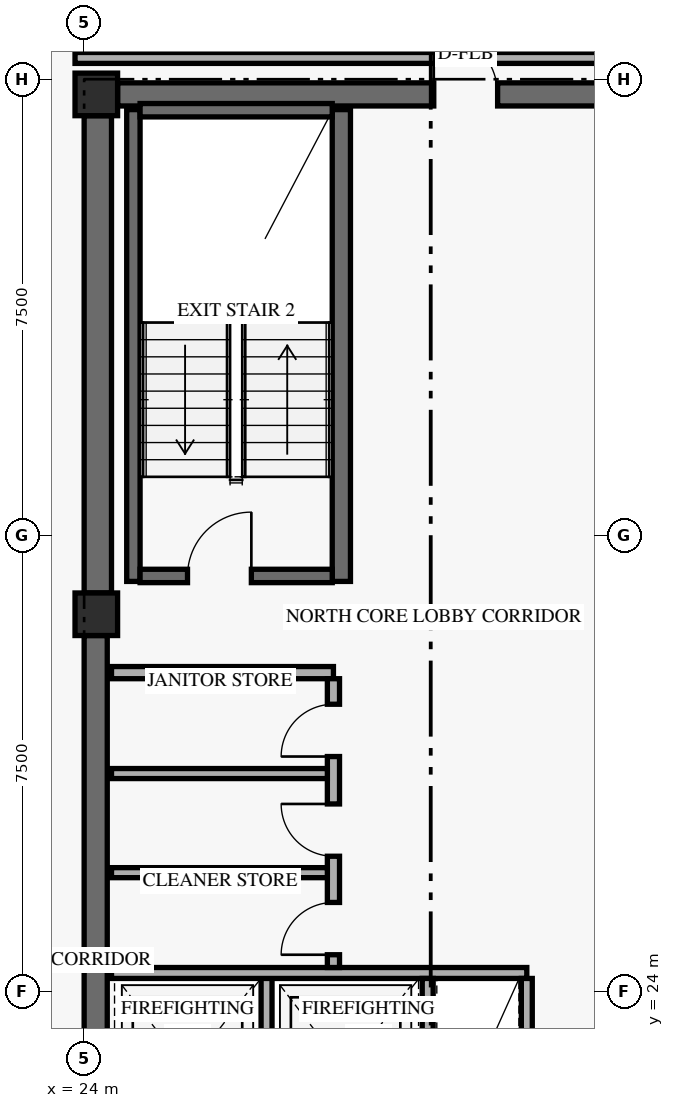
"""IFC4 building model, lengths in metres.
Left out: names, types, materials, properties, quantities, classifications, styles, units other than length and angle.
Written with IfcOpenShell. Run it as: python <this file> out.ifc"""

import sys

from ifc_helpers import new_model, si_unit, direction, frame, frame_2d, origin, origin_2d, place, context, subcontext, project, spatial, rectangle, extrude, element, fill, save


model = new_model("IFC4")
c1 = context("Model", 3, precision=1e-05, world=origin(), true_north=direction((0.0, 1.0)))
c2 = subcontext(c1, "Body", "Model", "MODEL_VIEW")
j1 = project(units=[si_unit("LENGTHUNIT", "METRE"), si_unit("PLANEANGLEUNIT", "RADIAN")], contexts=[c1])
p1 = place(None, origin())
s1 = spatial("IfcSite", under=j1, at=p1, CompositionType="ELEMENT")
p2 = place(p1, origin())
s2 = spatial("IfcBuilding", under=s1, at=p2, CompositionType="ELEMENT")
p3 = place(p2, frame((0.0, 0.0, 151.8)))
s3 = spatial("IfcBuildingStorey", under=s2, at=p3, CompositionType="ELEMENT", Elevation=151.8)
p4 = place(p3, frame((24.19, 17.9, 0.0), z_axis=(0.0, 0.0, 1.0), x_axis=(0.0, 1.0, 0.0)))
e1 = element("IfcWall", 1, at=p4, inside=s3, PredefinedType="SHEAR", context=c2, shape_type="SweptSolid", body=[
    extrude(rectangle(XDim=11.95, YDim=0.38, at=frame_2d((5.975, 0.0))), origin(), (0.0, 0.0, 1.0), 2.748),
])
p5 = place(p3, frame((24.225, 30.55, 0.0), z_axis=(0.0, 0.0, 1.0), x_axis=(0.0, 1.0, 0.0)))
e2 = element("IfcWall", 2, at=p5, inside=s3, PredefinedType="SHEAR", context=c2, shape_type="SweptSolid", body=[
    extrude(rectangle(XDim=7.85, YDim=0.45, at=frame_2d((3.925, 0.0))), origin(), (0.0, 0.0, 1.0), 2.748),
])
p6 = place(p3, frame((24.55, 38.75, 0.0), z_axis=(0.0, 0.0, 1.0), x_axis=(1.0, 0.0, 0.0)))
e3 = element("IfcWall", 3, at=p6, inside=s3, PredefinedType="SHEAR", context=c2, shape_type="SweptSolid", body=[
    extrude(rectangle(XDim=10.3, YDim=0.38, at=frame_2d((5.15, 0.0))), origin(), (0.0, 0.0, 1.0), 3.36),
])
p7 = place(p6, frame((5.2, 0.0, 0.0)))
e4 = element("IfcOpeningElement", 4, at=p7, cuts=e3, PredefinedType="OPENING", context=c2, shape_type="SweptSolid", body=[
    extrude(rectangle(XDim=1.05, YDim=2.15, at=frame_2d((0.525, 1.075))), frame((0.0, 0.2, 0.0), z_axis=(0.0, -1.0, 0.0), x_axis=(1.0, 0.0, 0.0)), (0.0, 0.0, 1.0), 0.4),
])
p8 = place(p3, frame((24.81, 30.74, 0.0), z_axis=(0.0, 0.0, 1.0), x_axis=(0.0, 1.0, 0.0)))
e5 = element("IfcWall", 5, at=p8, inside=s3, PredefinedType="SHEAR", context=c2, shape_type="SweptSolid", body=[
    extrude(rectangle(XDim=7.76, YDim=0.22, at=frame_2d((3.88, 0.0))), origin(), (0.0, 0.0, 1.0), 3.36),
])
p9 = place(p3, frame((28.23, 30.74, 0.0), z_axis=(0.0, 0.0, 1.0), x_axis=(0.0, 1.0, 0.0)))
e6 = element("IfcWall", 6, at=p9, inside=s3, PredefinedType="SHEAR", context=c2, shape_type="SweptSolid", body=[
    extrude(rectangle(XDim=7.76, YDim=0.3, at=frame_2d((3.88, 0.0))), origin(), (0.0, 0.0, 1.0), 3.36),
])
p10 = place(p3, frame((24.92, 30.83, 0.0), z_axis=(0.0, 0.0, 1.0), x_axis=(1.0, 0.0, 0.0)))
e7 = element("IfcWall", 7, at=p10, inside=s3, PredefinedType="SHEAR", context=c2, shape_type="SweptSolid", body=[
    extrude(rectangle(XDim=3.16, YDim=0.22, at=frame_2d((1.58, 0.0))), origin(), (0.0, 0.0, 1.0), 3.36),
])
p11 = place(p10, frame((0.78, 0.0, 0.0)))
e8 = element("IfcOpeningElement", 8, at=p11, cuts=e7, PredefinedType="OPENING", context=c2, shape_type="SweptSolid", body=[
    extrude(rectangle(XDim=1.05, YDim=2.15, at=frame_2d((0.525, 1.075))), frame((0.0, 0.12, 0.0), z_axis=(0.0, -1.0, 0.0), x_axis=(1.0, 0.0, 0.0)), (0.0, 0.0, 1.0), 0.24),
])
p12 = place(p3, frame((24.92, 38.49, 0.0), z_axis=(0.0, 0.0, 1.0), x_axis=(1.0, 0.0, 0.0)))
e9 = element("IfcWall", 9, at=p12, inside=s3, PredefinedType="SHEAR", context=c2, shape_type="SweptSolid", body=[
    extrude(rectangle(XDim=3.16, YDim=0.22, at=frame_2d((1.58, 0.0))), origin(), (0.0, 0.0, 1.0), 3.36),
])
for number, where, z_axis, x_axis in (
    (10, (24.2, 30.2, 0.0), (0.0, 0.0, 1.0), (1.0, 0.0, 0.0)),
    (11, (24.2, 38.75, 0.0), (0.0, 0.0, 1.0), (1.0, 0.0, 0.0)),
):
    element("IfcColumn", number, at=place(p3, frame(where, z_axis=z_axis, x_axis=x_axis)), inside=s3, PredefinedType="COLUMN", context=c2, shape_type="SweptSolid", body=[
        extrude(rectangle(XDim=0.7, YDim=0.7, at=origin_2d()), origin(), (0.0, 0.0, 1.0), 3.6),
    ])
p13 = place(p3, frame((27.0, 21.19, 0.0), z_axis=(0.0, 0.0, 1.0), x_axis=(0.0, 1.0, 0.0)))
e12 = element("IfcWall", 12, at=p13, inside=s3, PredefinedType="STANDARD", context=c2, shape_type="SweptSolid", body=[
    extrude(rectangle(XDim=3.11, YDim=0.18, at=frame_2d((1.555, 0.0))), origin(), (0.0, 0.0, 1.0), 3.36),
])
p14 = place(p3, frame((24.45, 24.3, 0.0), z_axis=(0.0, 0.0, 1.0), x_axis=(1.0, 0.0, 0.0)))
e13 = element("IfcWall", 13, at=p14, inside=s3, PredefinedType="STANDARD", context=c2, shape_type="SweptSolid", body=[
    extrude(rectangle(XDim=6.83, YDim=0.18, at=frame_2d((3.415, 0.0))), origin(), (0.0, 0.0, 1.0), 3.36),
])
for number, where, z_axis, x_axis in (
    (14, (29.65, 21.19, 0.0), (0.0, 0.0, 1.0), (0.0, 1.0, 0.0)),
    (15, (31.28, 21.19, 0.0), (0.0, 0.0, 1.0), (0.0, 1.0, 0.0)),
):
    element("IfcWall", number, at=place(p3, frame(where, z_axis=z_axis, x_axis=x_axis)), inside=s3, PredefinedType="STANDARD", context=c2, shape_type="SweptSolid", body=[
        extrude(rectangle(XDim=3.02, YDim=0.18, at=frame_2d((1.51, 0.0))), origin(), (0.0, 0.0, 1.0), 3.36),
    ])
p15 = place(p3, frame((24.45, 29.24, 0.0), z_axis=(0.0, 0.0, 1.0), x_axis=(1.0, 0.0, 0.0)))
e16 = element("IfcWall", 16, at=p15, inside=s3, PredefinedType="STANDARD", context=c2, shape_type="SweptSolid", body=[
    extrude(rectangle(XDim=3.65, YDim=0.2, at=frame_2d((1.825, 0.0))), origin(), (0.0, 0.0, 1.0), 3.36),
])
p16 = place(p3, frame((28.1, 24.39, 0.0), z_axis=(0.0, 0.0, 1.0), x_axis=(0.0, 1.0, 0.0)))
e17 = element("IfcWall", 17, at=p16, inside=s3, PredefinedType="STANDARD", context=c2, shape_type="SweptSolid", body=[
    extrude(rectangle(XDim=4.75, YDim=0.2, at=frame_2d((2.375, 0.0))), origin(), (0.0, 0.0, 1.0), 3.36),
])
p17 = place(p16, frame((0.21, 0.0, 0.0)))
e18 = element("IfcOpeningElement", 18, at=p17, cuts=e17, PredefinedType="OPENING", context=c2, shape_type="SweptSolid", body=[
    extrude(rectangle(XDim=0.86, YDim=2.1, at=frame_2d((0.43, 1.05))), frame((0.0, 0.11, 0.0), z_axis=(0.0, -1.0, 0.0), x_axis=(1.0, 0.0, 0.0)), (0.0, 0.0, 1.0), 0.22),
])
p18 = place(p16, frame((1.83, 0.0, 0.0)))
e19 = element("IfcOpeningElement", 19, at=p18, cuts=e17, PredefinedType="OPENING", context=c2, shape_type="SweptSolid", body=[
    extrude(rectangle(XDim=0.86, YDim=2.1, at=frame_2d((0.43, 1.05))), frame((0.0, 0.11, 0.0), z_axis=(0.0, -1.0, 0.0), x_axis=(1.0, 0.0, 0.0)), (0.0, 0.0, 1.0), 0.22),
])
p19 = place(p16, frame((3.47, 0.0, 0.0)))
e20 = element("IfcOpeningElement", 20, at=p19, cuts=e17, PredefinedType="OPENING", context=c2, shape_type="SweptSolid", body=[
    extrude(rectangle(XDim=0.86, YDim=2.1, at=frame_2d((0.43, 1.05))), frame((0.0, 0.11, 0.0), z_axis=(0.0, -1.0, 0.0), x_axis=(1.0, 0.0, 0.0)), (0.0, 0.0, 1.0), 0.22),
])
for number, where, z_axis, x_axis in (
    (21, (24.45, 25.95, 0.0), (0.0, 0.0, 1.0), (1.0, 0.0, 0.0)),
    (22, (24.45, 27.58, 0.0), (0.0, 0.0, 1.0), (1.0, 0.0, 0.0)),
):
    element("IfcWall", number, at=place(p3, frame(where, z_axis=z_axis, x_axis=x_axis)), inside=s3, PredefinedType="PARTITIONING", context=c2, shape_type="SweptSolid", body=[
        extrude(rectangle(XDim=3.55, YDim=0.165, at=frame_2d((1.775, 0.0))), origin(), (0.0, 0.0, 1.0), 3.36),
    ])
p20 = place(p3, frame((23.85, 39.35, 0.0), z_axis=(0.0, 0.0, 1.0), x_axis=(1.0, 0.0, 0.0)))
e23 = element("IfcWall", 23, at=p20, inside=s3, PredefinedType="STANDARD", context=c2, shape_type="SweptSolid", body=[
    extrude(rectangle(XDim=11.57, YDim=0.18, at=frame_2d((5.785, 0.0))), origin(), (0.0, 0.0, 1.0), 2.73),
])
p21 = place(p11, origin())
e24 = element("IfcDoor", 24, at=p21, inside=s3, OperationType="SINGLE_SWING_RIGHT", PredefinedType="DOOR", context=c2, shape_type="SweptSolid", body=[
    extrude(rectangle(XDim=1.05, YDim=2.15, at=frame_2d((0.525, 1.075))), frame((0.0, 0.025, 0.0), z_axis=(0.0, -1.0, 0.0), x_axis=(1.0, 0.0, 0.0)), (0.0, 0.0, 1.0), 0.05),
])
fill(e8, e24)
p22 = place(p17, origin())
e25 = element("IfcDoor", 25, at=p22, inside=s3, OperationType="SINGLE_SWING_LEFT", PredefinedType="DOOR", context=c2, shape_type="SweptSolid", body=[
    extrude(rectangle(XDim=0.86, YDim=2.1, at=frame_2d((0.43, 1.05))), frame((0.0, 0.025, 0.0), z_axis=(0.0, -1.0, 0.0), x_axis=(1.0, 0.0, 0.0)), (0.0, 0.0, 1.0), 0.05),
])
fill(e18, e25)
p23 = place(p18, origin())
e26 = element("IfcDoor", 26, at=p23, inside=s3, OperationType="SINGLE_SWING_RIGHT", PredefinedType="DOOR", context=c2, shape_type="SweptSolid", body=[
    extrude(rectangle(XDim=0.86, YDim=2.1, at=frame_2d((0.43, 1.05))), frame((0.0, 0.025, 0.0), z_axis=(0.0, -1.0, 0.0), x_axis=(1.0, 0.0, 0.0)), (0.0, 0.0, 1.0), 0.05),
])
fill(e19, e26)
p24 = place(p19, origin())
e27 = element("IfcDoor", 27, at=p24, inside=s3, OperationType="SINGLE_SWING_LEFT", PredefinedType="DOOR", context=c2, shape_type="SweptSolid", body=[
    extrude(rectangle(XDim=0.86, YDim=2.1, at=frame_2d((0.43, 1.05))), frame((0.0, 0.025, 0.0), z_axis=(0.0, -1.0, 0.0), x_axis=(1.0, 0.0, 0.0)), (0.0, 0.0, 1.0), 0.05),
])
fill(e20, e27)
p25 = place(p7, frame((1.05, 0.0, 0.0), z_axis=(0.0, 0.0, 1.0), x_axis=(-1.0, 0.0, 0.0)))
e28 = element("IfcDoor", 28, at=p25, inside=s3, OperationType="SINGLE_SWING_RIGHT", PredefinedType="DOOR", context=c2, shape_type="SweptSolid", body=[
    extrude(rectangle(XDim=1.05, YDim=2.15, at=frame_2d((0.525, 1.075))), frame((0.0, 0.025, 0.0), z_axis=(0.0, -1.0, 0.0), x_axis=(1.0, 0.0, 0.0)), (0.0, 0.0, 1.0), 0.05),
])
fill(e4, e28)
save(model, sys.argv[1])
